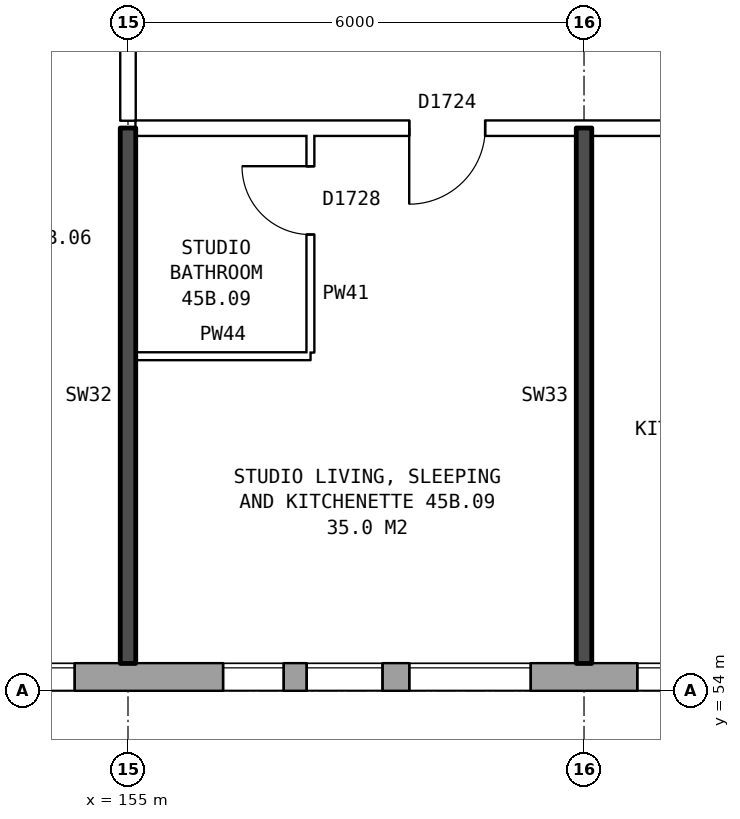
"""IFC4 building model, lengths in metres.
Left out: names, types, materials, properties, quantities, classifications, styles, units other than length and angle.
Written with IfcOpenShell. Run it as: python <this file> out.ifc"""

import sys

from ifc_helpers import new_model, si_unit, direction, frame, frame_2d, origin, place, context, subcontext, project, spatial, rectangle, extrude, element, fill, save


model = new_model("IFC4")
c1 = context("Model", 3, precision=1e-05, world=origin(), true_north=direction((0.0, 1.0)))
c2 = subcontext(c1, "Body", "Model", "MODEL_VIEW")
j1 = project(units=[si_unit("LENGTHUNIT", "METRE"), si_unit("PLANEANGLEUNIT", "RADIAN")], contexts=[c1])
p1 = place(None, origin())
s1 = spatial("IfcSite", under=j1, at=p1, CompositionType="ELEMENT")
p2 = place(p1, origin())
s2 = spatial("IfcBuilding", under=s1, at=p2, CompositionType="ELEMENT")
p3 = place(p2, frame((0.0, 0.0, 160.9)))
s3 = spatial("IfcBuildingStorey", under=s2, at=p3, CompositionType="ELEMENT", Elevation=160.9)
p4 = place(p3, frame((134.075, 54.18, 0.0), z_axis=(0.0, 0.0, 1.0), x_axis=(1.0, 0.0, 0.0)))
e1 = element("IfcWall", 1, at=p4, inside=s3, PredefinedType="STANDARD", context=c2, shape_type="SweptSolid", body=[
    extrude(rectangle(XDim=34.351, YDim=0.36, at=frame_2d((17.175, 0.0))), origin(), (0.0, 0.0, 1.0), 2.85),
])
p5 = place(p4, frame((0.625, 0.0, 0.8)))
e2 = element("IfcOpeningElement", 2, at=p5, cuts=e1, PredefinedType="OPENING", context=c2, shape_type="SweptSolid", body=[
    extrude(rectangle(XDim=1.6, YDim=1.8, at=frame_2d((0.8, 0.9))), frame((0.0, 0.19, 0.0), z_axis=(0.0, -1.0, 0.0), x_axis=(1.0, 0.0, 0.0)), (0.0, 0.0, 1.0), 0.38),
])
p6 = place(p4, frame((3.625, 0.0, 0.8)))
e3 = element("IfcOpeningElement", 3, at=p6, cuts=e1, PredefinedType="OPENING", context=c2, shape_type="SweptSolid", body=[
    extrude(rectangle(XDim=1.6, YDim=1.8, at=frame_2d((0.8, 0.9))), frame((0.0, 0.19, 0.0), z_axis=(0.0, -1.0, 0.0), x_axis=(1.0, 0.0, 0.0)), (0.0, 0.0, 1.0), 0.38),
])
p7 = place(p4, frame((6.625, 0.0, 0.8)))
e4 = element("IfcOpeningElement", 4, at=p7, cuts=e1, PredefinedType="OPENING", context=c2, shape_type="SweptSolid", body=[
    extrude(rectangle(XDim=1.6, YDim=1.8, at=frame_2d((0.8, 0.9))), frame((0.0, 0.19, 0.0), z_axis=(0.0, -1.0, 0.0), x_axis=(1.0, 0.0, 0.0)), (0.0, 0.0, 1.0), 0.38),
])
p8 = place(p4, frame((9.625, 0.0, 0.8)))
e5 = element("IfcOpeningElement", 5, at=p8, cuts=e1, PredefinedType="OPENING", context=c2, shape_type="SweptSolid", body=[
    extrude(rectangle(XDim=1.6, YDim=1.8, at=frame_2d((0.8, 0.9))), frame((0.0, 0.19, 0.0), z_axis=(0.0, -1.0, 0.0), x_axis=(1.0, 0.0, 0.0)), (0.0, 0.0, 1.0), 0.38),
])
p9 = place(p4, frame((12.625, 0.0, 0.15)))
e6 = element("IfcOpeningElement", 6, at=p9, cuts=e1, PredefinedType="OPENING", context=c2, shape_type="SweptSolid", body=[
    extrude(rectangle(XDim=0.8, YDim=0.9, at=frame_2d((0.4, 0.45))), frame((0.0, 0.19, 0.0), z_axis=(0.0, -1.0, 0.0), x_axis=(1.0, 0.0, 0.0)), (0.0, 0.0, 1.0), 0.38),
])
p10 = place(p4, frame((15.625, 0.0, 0.8)))
e7 = element("IfcOpeningElement", 7, at=p10, cuts=e1, PredefinedType="OPENING", context=c2, shape_type="SweptSolid", body=[
    extrude(rectangle(XDim=1.6, YDim=1.8, at=frame_2d((0.8, 0.9))), frame((0.0, 0.19, 0.0), z_axis=(0.0, -1.0, 0.0), x_axis=(1.0, 0.0, 0.0)), (0.0, 0.0, 1.0), 0.38),
])
p11 = place(p4, frame((18.625, 0.0, 0.8)))
e8 = element("IfcOpeningElement", 8, at=p11, cuts=e1, PredefinedType="OPENING", context=c2, shape_type="SweptSolid", body=[
    extrude(rectangle(XDim=1.6, YDim=1.8, at=frame_2d((0.8, 0.9))), frame((0.0, 0.19, 0.0), z_axis=(0.0, -1.0, 0.0), x_axis=(1.0, 0.0, 0.0)), (0.0, 0.0, 1.0), 0.38),
])
p12 = place(p4, frame((22.175, 0.0, 1.7)))
e9 = element("IfcOpeningElement", 9, at=p12, cuts=e1, PredefinedType="OPENING", context=c2, shape_type="SweptSolid", body=[
    extrude(rectangle(XDim=0.8, YDim=0.9, at=frame_2d((0.4, 0.45))), frame((0.0, 0.19, 0.0), z_axis=(0.0, -1.0, 0.0), x_axis=(1.0, 0.0, 0.0)), (0.0, 0.0, 1.0), 0.38),
])
p13 = place(p4, frame((24.625, 0.0, 0.8)))
e10 = element("IfcOpeningElement", 10, at=p13, cuts=e1, PredefinedType="OPENING", context=c2, shape_type="SweptSolid", body=[
    extrude(rectangle(XDim=1.6, YDim=1.8, at=frame_2d((0.8, 0.9))), frame((0.0, 0.19, 0.0), z_axis=(0.0, -1.0, 0.0), x_axis=(1.0, 0.0, 0.0)), (0.0, 0.0, 1.0), 0.38),
])
p14 = place(p4, frame((27.625, 0.0, 0.8)))
e11 = element("IfcOpeningElement", 11, at=p14, cuts=e1, PredefinedType="OPENING", context=c2, shape_type="SweptSolid", body=[
    extrude(rectangle(XDim=1.6, YDim=1.8, at=frame_2d((0.8, 0.9))), frame((0.0, 0.19, 0.0), z_axis=(0.0, -1.0, 0.0), x_axis=(1.0, 0.0, 0.0)), (0.0, 0.0, 1.0), 0.38),
])
p15 = place(p4, frame((30.625, 0.0, 0.8)))
e12 = element("IfcOpeningElement", 12, at=p15, cuts=e1, PredefinedType="OPENING", context=c2, shape_type="SweptSolid", body=[
    extrude(rectangle(XDim=1.6, YDim=1.8, at=frame_2d((0.8, 0.9))), frame((0.0, 0.19, 0.0), z_axis=(0.0, -1.0, 0.0), x_axis=(1.0, 0.0, 0.0)), (0.0, 0.0, 1.0), 0.38),
])
p16 = place(p4, frame((13.725, 0.0, 0.25)))
e13 = element("IfcOpeningElement", 13, at=p16, cuts=e1, PredefinedType="OPENING", context=c2, shape_type="SweptSolid", body=[
    extrude(rectangle(XDim=1.0, YDim=1.8, at=frame_2d((0.5, 0.9))), frame((0.0, 0.19, 0.0), z_axis=(0.0, -1.0, 0.0), x_axis=(1.0, 0.0, 0.0)), (0.0, 0.0, 1.0), 0.38),
])
p17 = place(p4, frame((23.275, 0.0, 0.8)))
e14 = element("IfcOpeningElement", 14, at=p17, cuts=e1, PredefinedType="OPENING", context=c2, shape_type="SweptSolid", body=[
    extrude(rectangle(XDim=1.0, YDim=1.8, at=frame_2d((0.5, 0.9))), frame((0.0, 0.19, 0.0), z_axis=(0.0, -1.0, 0.0), x_axis=(1.0, 0.0, 0.0)), (0.0, 0.0, 1.0), 0.38),
])
p18 = place(p3, frame((155.1, 58.4, 0.0), z_axis=(0.0, 0.0, 1.0), x_axis=(1.0, 0.0, 0.0)))
e15 = element("IfcWall", 15, at=p18, inside=s3, PredefinedType="PARTITIONING", context=c2, shape_type="SweptSolid", body=[
    extrude(rectangle(XDim=2.3, YDim=0.1, at=frame_2d((1.15, 0.0))), origin(), (0.0, 0.0, 1.0), 2.85),
])
p19 = place(p3, frame((155.1, 61.4, 0.0), z_axis=(0.0, 0.0, 1.0), x_axis=(1.0, 0.0, 0.0)))
e16 = element("IfcWall", 16, at=p19, inside=s3, PredefinedType="PARTITIONING", context=c2, shape_type="SweptSolid", body=[
    extrude(rectangle(XDim=16.04, YDim=0.2, at=frame_2d((8.02, 0.0))), origin(), (0.0, 0.0, 1.0), 2.85),
])
p20 = place(p19, frame((3.6, 0.0, 0.0)))
e17 = element("IfcOpeningElement", 17, at=p20, cuts=e16, PredefinedType="OPENING", context=c2, shape_type="SweptSolid", body=[
    extrude(rectangle(XDim=1.0, YDim=2.1, at=frame_2d((0.5, 1.05))), frame((0.0, 0.11, 0.0), z_axis=(0.0, -1.0, 0.0), x_axis=(1.0, 0.0, 0.0)), (0.0, 0.0, 1.0), 0.22),
])
p21 = place(p19, frame((8.4, 0.0, 0.0)))
e18 = element("IfcOpeningElement", 18, at=p21, cuts=e16, PredefinedType="OPENING", context=c2, shape_type="SweptSolid", body=[
    extrude(rectangle(XDim=1.0, YDim=2.1, at=frame_2d((0.5, 1.05))), frame((0.0, 0.11, 0.0), z_axis=(0.0, -1.0, 0.0), x_axis=(1.0, 0.0, 0.0)), (0.0, 0.0, 1.0), 0.22),
])
p22 = place(p3, frame((155.0, 54.36, 0.0), z_axis=(0.0, 0.0, 1.0), x_axis=(0.0, 1.0, 0.0)))
e19 = element("IfcWall", 19, at=p22, inside=s3, PredefinedType="SOLIDWALL", context=c2, shape_type="SweptSolid", body=[
    extrude(rectangle(XDim=7.04, YDim=0.2, at=frame_2d((3.52, 0.0))), origin(), (0.0, 0.0, 1.0), 2.85),
])
p23 = place(p3, frame((155.0, 61.5, 0.0), z_axis=(0.0, 0.0, 1.0), x_axis=(0.0, 1.0, 0.0)))
e20 = element("IfcWall", 20, at=p23, inside=s3, PredefinedType="PARTITIONING", context=c2, shape_type="SweptSolid", body=[
    extrude(rectangle(XDim=2.2, YDim=0.2, at=frame_2d((1.1, 0.0))), origin(), (0.0, 0.0, 1.0), 2.85),
])
p24 = place(p3, frame((157.4, 58.45, 0.0), z_axis=(0.0, 0.0, 1.0), x_axis=(0.0, 1.0, 0.0)))
e21 = element("IfcWall", 21, at=p24, inside=s3, PredefinedType="PARTITIONING", context=c2, shape_type="SweptSolid", body=[
    extrude(rectangle(XDim=2.85, YDim=0.1, at=frame_2d((1.425, 0.0))), origin(), (0.0, 0.0, 1.0), 2.85),
])
p25 = place(p24, frame((1.55, 0.0, 0.0)))
e22 = element("IfcOpeningElement", 22, at=p25, cuts=e21, PredefinedType="OPENING", context=c2, shape_type="SweptSolid", body=[
    extrude(rectangle(XDim=0.9, YDim=2.1, at=frame_2d((0.45, 1.05))), frame((0.0, 0.06, 0.0), z_axis=(0.0, -1.0, 0.0), x_axis=(1.0, 0.0, 0.0)), (0.0, 0.0, 1.0), 0.12),
])
p26 = place(p3, frame((161.0, 54.36, 0.0), z_axis=(0.0, 0.0, 1.0), x_axis=(0.0, 1.0, 0.0)))
e23 = element("IfcWall", 23, at=p26, inside=s3, PredefinedType="SOLIDWALL", context=c2, shape_type="SweptSolid", body=[
    extrude(rectangle(XDim=7.04, YDim=0.2, at=frame_2d((3.52, 0.0))), origin(), (0.0, 0.0, 1.0), 2.85),
])
p27 = place(p11, origin())
e24 = element("IfcWindow", 24, at=p27, inside=s3, PartitioningType="SINGLE_PANEL", PredefinedType="WINDOW", context=c2, shape_type="SweptSolid", body=[
    extrude(rectangle(XDim=1.6, YDim=1.8, at=frame_2d((0.8, 0.9))), frame((0.0, 0.15, 0.0), z_axis=(0.0, -1.0, 0.0), x_axis=(1.0, 0.0, 0.0)), (0.0, 0.0, 1.0), 0.06),
])
fill(e8, e24)
p28 = place(p12, origin())
e25 = element("IfcWindow", 25, at=p28, inside=s3, PartitioningType="SINGLE_PANEL", PredefinedType="WINDOW", context=c2, shape_type="SweptSolid", body=[
    extrude(rectangle(XDim=0.8, YDim=0.9, at=frame_2d((0.4, 0.45))), frame((0.0, 0.15, 0.0), z_axis=(0.0, -1.0, 0.0), x_axis=(1.0, 0.0, 0.0)), (0.0, 0.0, 1.0), 0.06),
])
fill(e9, e25)
p29 = place(p13, origin())
e26 = element("IfcWindow", 26, at=p29, inside=s3, PartitioningType="SINGLE_PANEL", PredefinedType="WINDOW", context=c2, shape_type="SweptSolid", body=[
    extrude(rectangle(XDim=1.6, YDim=1.8, at=frame_2d((0.8, 0.9))), frame((0.0, 0.15, 0.0), z_axis=(0.0, -1.0, 0.0), x_axis=(1.0, 0.0, 0.0)), (0.0, 0.0, 1.0), 0.06),
])
fill(e10, e26)
p30 = place(p14, origin())
e27 = element("IfcWindow", 27, at=p30, inside=s3, PartitioningType="SINGLE_PANEL", PredefinedType="WINDOW", context=c2, shape_type="SweptSolid", body=[
    extrude(rectangle(XDim=1.6, YDim=1.8, at=frame_2d((0.8, 0.9))), frame((0.0, 0.15, 0.0), z_axis=(0.0, -1.0, 0.0), x_axis=(1.0, 0.0, 0.0)), (0.0, 0.0, 1.0), 0.06),
])
fill(e11, e27)
p31 = place(p20, frame((1.0, 0.0, 0.0), z_axis=(0.0, 0.0, 1.0), x_axis=(-1.0, 0.0, 0.0)))
e28 = element("IfcDoor", 28, at=p31, inside=s3, OperationType="SINGLE_SWING_RIGHT", PredefinedType="DOOR", context=c2, shape_type="SweptSolid", body=[
    extrude(rectangle(XDim=1.0, YDim=2.1, at=frame_2d((0.5, 1.05))), frame((0.0, 0.025, 0.0), z_axis=(0.0, -1.0, 0.0), x_axis=(1.0, 0.0, 0.0)), (0.0, 0.0, 1.0), 0.05),
])
fill(e17, e28)
p32 = place(p25, origin())
e29 = element("IfcDoor", 29, at=p32, inside=s3, OperationType="SINGLE_SWING_RIGHT", PredefinedType="DOOR", context=c2, shape_type="SweptSolid", body=[
    extrude(rectangle(XDim=0.9, YDim=2.1, at=frame_2d((0.45, 1.05))), frame((0.0, 0.025, 0.0), z_axis=(0.0, -1.0, 0.0), x_axis=(1.0, 0.0, 0.0)), (0.0, 0.0, 1.0), 0.05),
])
fill(e22, e29)
p33 = place(p17, origin())
e30 = element("IfcWindow", 30, at=p33, inside=s3, PartitioningType="SINGLE_PANEL", PredefinedType="WINDOW", context=c2, shape_type="SweptSolid", body=[
    extrude(rectangle(XDim=1.0, YDim=1.8, at=frame_2d((0.5, 0.9))), frame((0.0, 0.15, 0.0), z_axis=(0.0, -1.0, 0.0), x_axis=(1.0, 0.0, 0.0)), (0.0, 0.0, 1.0), 0.06),
])
fill(e14, e30)
save(model, sys.argv[1])
